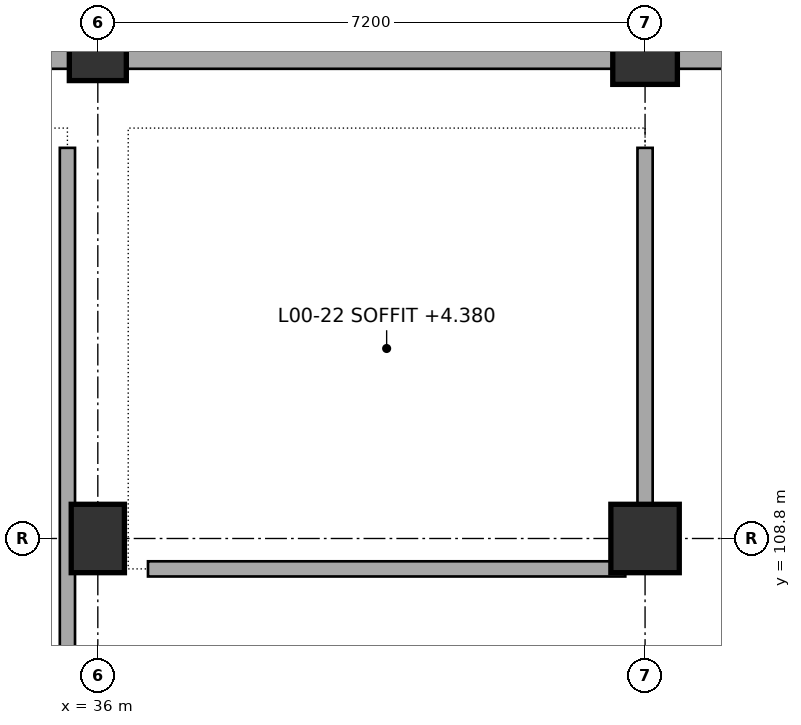
"""IFC4 building model, lengths in metres.
Left out: names, types, materials, properties, quantities, classifications, styles, units other than length and angle.
Written with IfcOpenShell. Run it as: python <this file> out.ifc"""

import sys

from ifc_helpers import new_model, si_unit, direction, frame, frame_2d, origin, origin_2d, place, context, subcontext, project, spatial, rectangle, extrude, element, fill, save


model = new_model("IFC4")
c1 = context("Model", 3, precision=1e-05, world=origin(), true_north=direction((0.0, 1.0)))
c2 = subcontext(c1, "Body", "Model", "MODEL_VIEW")
j1 = project(units=[si_unit("LENGTHUNIT", "METRE"), si_unit("PLANEANGLEUNIT", "RADIAN")], contexts=[c1])
p1 = place(None, origin())
s1 = spatial("IfcSite", under=j1, at=p1, CompositionType="ELEMENT")
p2 = place(p1, origin())
s2 = spatial("IfcBuilding", under=s1, at=p2, CompositionType="ELEMENT")
p3 = place(p2, origin())
s3 = spatial("IfcBuildingStorey", under=s2, at=p3, CompositionType="ELEMENT", Elevation=0.0)
p4 = place(p3, frame((36.0, 108.8, 0.0), z_axis=(0.0, 0.0, 1.0), x_axis=(1.0, 0.0, 0.0)))
e1 = element("IfcColumn", 1, at=p4, inside=s3, PredefinedType="COLUMN", context=c2, shape_type="SweptSolid", body=[
    extrude(rectangle(XDim=0.7, YDim=0.9, at=origin_2d()), origin(), (0.0, 0.0, 1.0), 4.8),
])
p5 = place(p3, frame((36.0, 115.2, 0.0), z_axis=(0.0, 0.0, 1.0), x_axis=(1.0, 0.0, 0.0)))
e2 = element("IfcColumn", 2, at=p5, inside=s3, PredefinedType="COLUMN", context=c2, shape_type="SweptSolid", body=[
    extrude(rectangle(XDim=0.75, YDim=0.75, at=origin_2d()), origin(), (0.0, 0.0, 1.0), 4.8),
])
p6 = place(p3, frame((43.2, 108.8, 0.0), z_axis=(0.0, 0.0, 1.0), x_axis=(1.0, 0.0, 0.0)))
e3 = element("IfcColumn", 3, at=p6, inside=s3, PredefinedType="COLUMN", context=c2, shape_type="SweptSolid", body=[
    extrude(rectangle(XDim=0.9, YDim=0.9, at=origin_2d()), origin(), (0.0, 0.0, 1.0), 4.8),
])
p7 = place(p3, frame((43.2, 115.2, 0.0), z_axis=(0.0, 0.0, 1.0), x_axis=(1.0, 0.0, 0.0)))
e4 = element("IfcColumn", 4, at=p7, inside=s3, PredefinedType="COLUMN", context=c2, shape_type="SweptSolid", body=[
    extrude(rectangle(XDim=0.85, YDim=0.85, at=origin_2d()), origin(), (0.0, 0.0, 1.0), 4.8),
])
p8 = place(p3, frame((28.8, 115.2, 0.0), z_axis=(0.0, 0.0, 1.0), x_axis=(1.0, 0.0, 0.0)))
e5 = element("IfcWall", 5, at=p8, inside=s3, PredefinedType="STANDARD", context=c2, shape_type="SweptSolid", body=[
    extrude(rectangle(XDim=7.2, YDim=0.44, at=frame_2d((3.6, 0.0))), origin(), (0.0, 0.0, 1.0), 4.44),
])
p9 = place(p8, frame((2.5, 0.0, 0.0)))
e6 = element("IfcOpeningElement", 6, at=p9, cuts=e5, PredefinedType="OPENING", context=c2, shape_type="SweptSolid", body=[
    extrude(rectangle(XDim=2.2, YDim=2.45, at=frame_2d((1.1, 1.225))), frame((0.0, 0.23, 0.0), z_axis=(0.0, -1.0, 0.0), x_axis=(1.0, 0.0, 0.0)), (0.0, 0.0, 1.0), 0.46),
])
p10 = place(p3, frame((36.0, 115.2, 0.0), z_axis=(0.0, 0.0, 1.0), x_axis=(1.0, 0.0, 0.0)))
e7 = element("IfcWall", 7, at=p10, inside=s3, PredefinedType="STANDARD", context=c2, shape_type="SweptSolid", body=[
    extrude(rectangle(XDim=7.2, YDim=0.44, at=frame_2d((3.6, 0.0))), origin(), (0.0, 0.0, 1.0), 4.44),
])
p11 = place(p10, frame((2.5, 0.0, 0.0)))
e8 = element("IfcOpeningElement", 8, at=p11, cuts=e7, PredefinedType="OPENING", context=c2, shape_type="SweptSolid", body=[
    extrude(rectangle(XDim=2.2, YDim=2.45, at=frame_2d((1.1, 1.225))), frame((0.0, 0.23, 0.0), z_axis=(0.0, -1.0, 0.0), x_axis=(1.0, 0.0, 0.0)), (0.0, 0.0, 1.0), 0.46),
])
p12 = place(p3, frame((43.2, 115.2, 0.0), z_axis=(0.0, 0.0, 1.0), x_axis=(1.0, 0.0, 0.0)))
e9 = element("IfcWall", 9, at=p12, inside=s3, PredefinedType="STANDARD", context=c2, shape_type="SweptSolid", body=[
    extrude(rectangle(XDim=7.2, YDim=0.44, at=frame_2d((3.6, 0.0))), origin(), (0.0, 0.0, 1.0), 4.44),
])
p13 = place(p12, frame((2.5, 0.0, 0.0)))
e10 = element("IfcOpeningElement", 10, at=p13, cuts=e9, PredefinedType="OPENING", context=c2, shape_type="SweptSolid", body=[
    extrude(rectangle(XDim=2.2, YDim=2.45, at=frame_2d((1.1, 1.225))), frame((0.0, 0.23, 0.0), z_axis=(0.0, -1.0, 0.0), x_axis=(1.0, 0.0, 0.0)), (0.0, 0.0, 1.0), 0.46),
])
p14 = place(p3, frame((35.6, 90.06, 0.0), z_axis=(0.0, 0.0, 1.0), x_axis=(0.0, 1.0, 0.0)))
e11 = element("IfcWall", 11, at=p14, inside=s3, PredefinedType="PARTITIONING", context=c2, shape_type="SweptSolid", body=[
    extrude(rectangle(XDim=23.88, YDim=0.2, at=frame_2d((11.94, 0.0))), origin(), (0.0, 0.0, 1.0), 3.215),
])
p15 = place(p3, frame((36.66, 108.4, 0.0), z_axis=(0.0, 0.0, 1.0), x_axis=(1.0, 0.0, 0.0)))
e12 = element("IfcWall", 12, at=p15, inside=s3, PredefinedType="PARTITIONING", context=c2, shape_type="SweptSolid", body=[
    extrude(rectangle(XDim=6.28, YDim=0.2, at=frame_2d((3.14, 0.0))), origin(), (0.0, 0.0, 1.0), 3.715),
])
p16 = place(p15, frame((2.59, 0.0, 0.0)))
e13 = element("IfcOpeningElement", 13, at=p16, cuts=e12, PredefinedType="OPENING", context=c2, shape_type="SweptSolid", body=[
    extrude(rectangle(XDim=1.1, YDim=2.15, at=frame_2d((0.55, 1.075))), frame((0.0, 0.11, 0.0), z_axis=(0.0, -1.0, 0.0), x_axis=(1.0, 0.0, 0.0)), (0.0, 0.0, 1.0), 0.22),
])
p17 = place(p3, frame((43.2, 108.66, 0.0), z_axis=(0.0, 0.0, 1.0), x_axis=(0.0, 1.0, 0.0)))
e14 = element("IfcWall", 14, at=p17, inside=s3, PredefinedType="PARTITIONING", context=c2, shape_type="SweptSolid", body=[
    extrude(rectangle(XDim=5.28, YDim=0.2, at=frame_2d((2.64, 0.0))), origin(), (0.0, 0.0, 1.0), 3.215),
])
p18 = place(p11, frame((2.2, 0.0, 0.0), z_axis=(0.0, 0.0, 1.0), x_axis=(-1.0, 0.0, 0.0)))
e15 = element("IfcDoor", 15, at=p18, inside=s3, OperationType="DOUBLE_DOOR_SINGLE_SWING", PredefinedType="DOOR", context=c2, shape_type="SweptSolid", body=[
    extrude(rectangle(XDim=2.2, YDim=2.45, at=frame_2d((1.1, 1.225))), frame((0.0, 0.025, 0.0), z_axis=(0.0, -1.0, 0.0), x_axis=(1.0, 0.0, 0.0)), (0.0, 0.0, 1.0), 0.05),
])
fill(e8, e15)
p19 = place(p16, origin())
e16 = element("IfcDoor", 16, at=p19, inside=s3, OperationType="SINGLE_SWING_LEFT", PredefinedType="DOOR", context=c2, shape_type="SweptSolid", body=[
    extrude(rectangle(XDim=1.1, YDim=2.15, at=frame_2d((0.55, 1.075))), frame((0.0, 0.025, 0.0), z_axis=(0.0, -1.0, 0.0), x_axis=(1.0, 0.0, 0.0)), (0.0, 0.0, 1.0), 0.05),
])
fill(e13, e16)
save(model, sys.argv[1])
